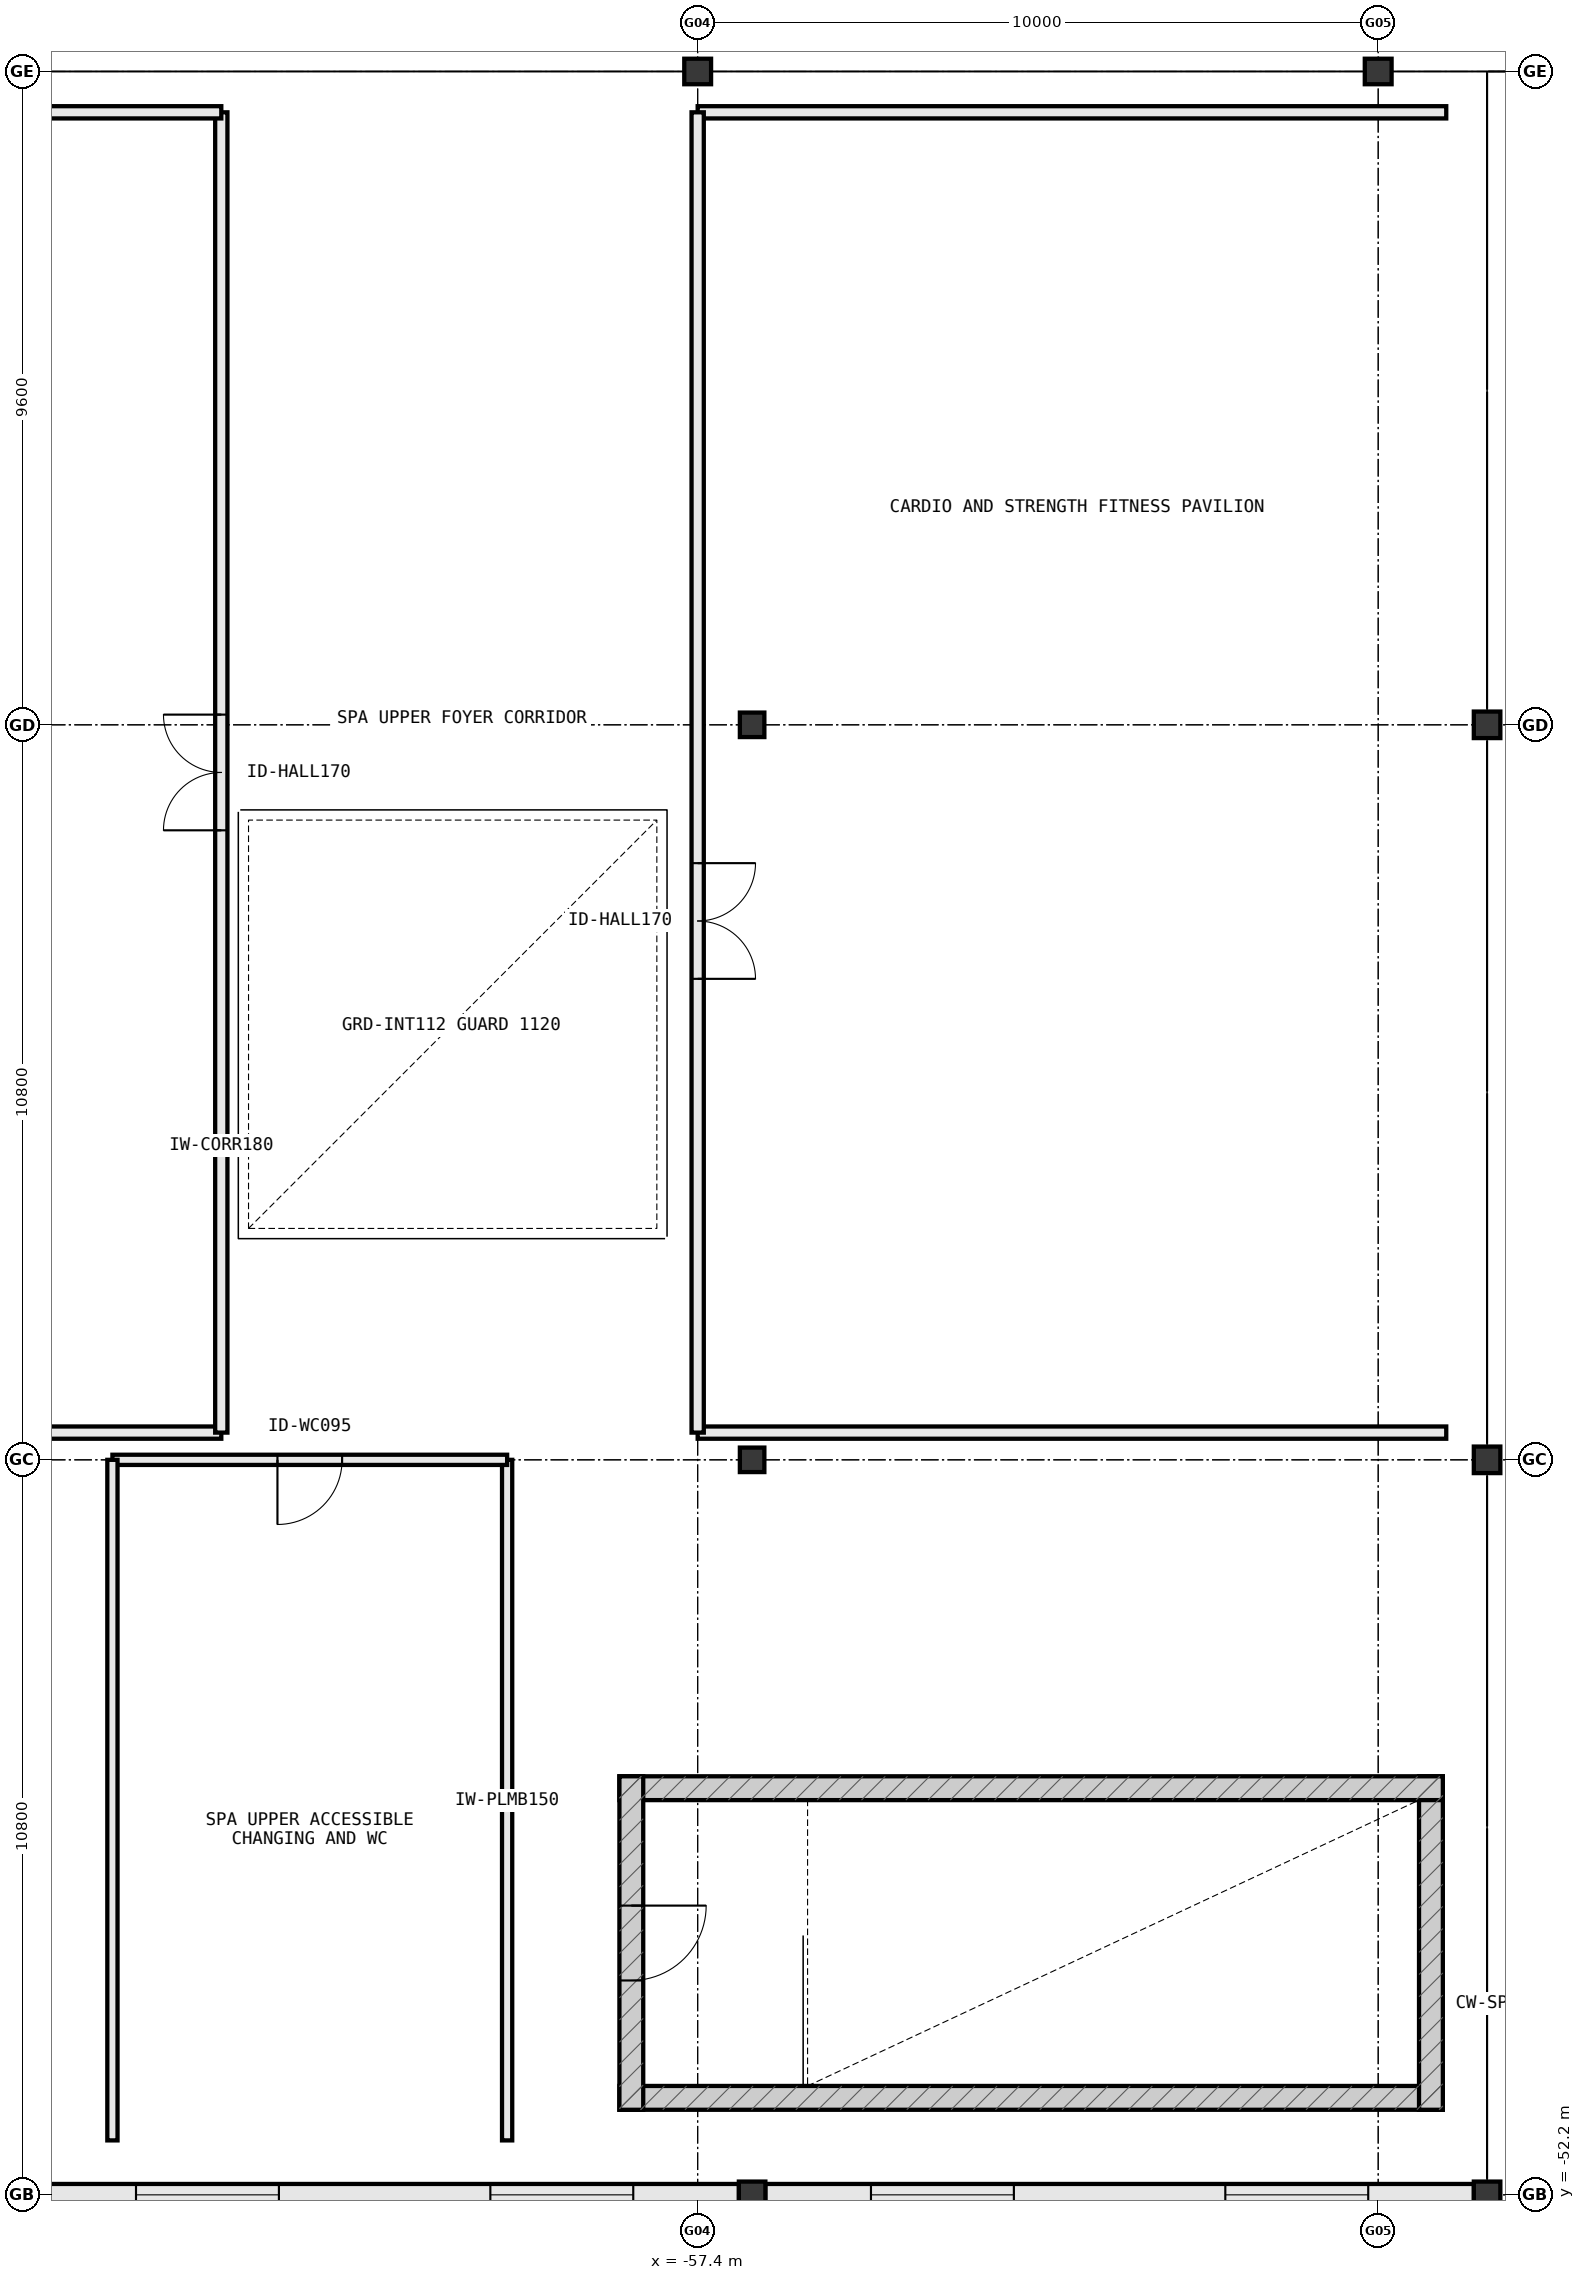
"""IFC4 building model, lengths in metres.
Left out: names, types, materials, properties, quantities, classifications, styles, units other than length and angle.
Written with IfcOpenShell. Run it as: python <this file> out.ifc"""

import sys

from ifc_helpers import new_model, si_unit, direction, frame, frame_2d, origin, origin_2d, place, context, subcontext, project, spatial, rectangle, i_section, extrude, element, fill, save


model = new_model("IFC4")
c1 = context("Model", 3, precision=1e-05, world=origin(), true_north=direction((0.0, 1.0)))
c2 = subcontext(c1, "Body", "Model", "MODEL_VIEW")
j1 = project(units=[si_unit("LENGTHUNIT", "METRE"), si_unit("PLANEANGLEUNIT", "RADIAN")], contexts=[c1])
p1 = place(None, origin())
s1 = spatial("IfcSite", under=j1, at=p1, CompositionType="ELEMENT")
p2 = place(p1, origin())
s2 = spatial("IfcBuilding", under=s1, at=p2, CompositionType="ELEMENT")
p3 = place(p2, frame((0.0, 0.0, 10.8)))
s3 = spatial("IfcBuildingStorey", under=s2, at=p3, CompositionType="ELEMENT", Elevation=10.8)
for number, where, z_axis, x_axis in (
    (1, (-57.4, -21.0, 0.0), (0.0, 0.0, 1.0), (1.0, 0.0, 0.0)),
    (2, (-47.4, -21.0, 0.0), (0.0, 0.0, 1.0), (1.0, 0.0, 0.0)),
):
    element("IfcColumn", number, at=place(p3, frame(where, z_axis=z_axis, x_axis=x_axis)), inside=s3, PredefinedType="COLUMN", context=c2, shape_type="SweptSolid", body=[
        extrude(i_section(OverallWidth=0.394, OverallDepth=0.375, WebThickness=0.017, FlangeThickness=0.028, at=origin_2d()), origin(), (0.0, 0.0, 1.0), 5.4),
    ])
p4 = place(p3, frame((-56.6, -52.2, 0.0), z_axis=(0.0, 0.0, 1.0), x_axis=(1.0, 0.0, 0.0)))
e3 = element("IfcColumn", 3, at=p4, inside=s3, PredefinedType="COLUMN", context=c2, shape_type="SweptSolid", body=[
    extrude(rectangle(XDim=0.39, YDim=0.39, at=origin_2d()), origin(), (0.0, 0.0, 1.0), 5.4),
])
for number, where, z_axis, x_axis in (
    (4, (-56.6, -41.4, 0.0), (0.0, 0.0, 1.0), (1.0, 0.0, 0.0)),
    (5, (-56.6, -30.6, 0.0), (0.0, 0.0, 1.0), (1.0, 0.0, 0.0)),
):
    element("IfcColumn", number, at=place(p3, frame(where, z_axis=z_axis, x_axis=x_axis)), inside=s3, PredefinedType="COLUMN", context=c2, shape_type="SweptSolid", body=[
        extrude(rectangle(XDim=0.36, YDim=0.36, at=origin_2d()), origin(), (0.0, 0.0, 1.0), 5.4),
    ])
for number, where, z_axis, x_axis in (
    (6, (-45.8, -52.2, 0.0), (0.0, 0.0, 1.0), (1.0, 0.0, 0.0)),
    (7, (-45.8, -41.4, 0.0), (0.0, 0.0, 1.0), (1.0, 0.0, 0.0)),
    (8, (-45.8, -30.6, 0.0), (0.0, 0.0, 1.0), (1.0, 0.0, 0.0)),
):
    element("IfcColumn", number, at=place(p3, frame(where, z_axis=z_axis, x_axis=x_axis)), inside=s3, PredefinedType="COLUMN", context=c2, shape_type="SweptSolid", body=[
        extrude(rectangle(XDim=0.39, YDim=0.39, at=origin_2d()), origin(), (0.0, 0.0, 1.0), 5.4),
    ])
p5 = place(p3, frame((-67.207, -52.2, 0.0), z_axis=(0.0, 0.0, 1.0), x_axis=(1.0, 0.0, 0.0)))
e9 = element("IfcWall", 9, at=p5, inside=s3, PredefinedType="STANDARD", context=c2, shape_type="SweptSolid", body=[
    extrude(rectangle(XDim=10.414, YDim=0.32, at=frame_2d((5.207, 0.0))), origin(), (0.0, 0.0, 1.0), 4.016),
])
p6 = place(p5, frame((1.553, 0.0, 0.85)))
e10 = element("IfcOpeningElement", 10, at=p6, cuts=e9, PredefinedType="OPENING", context=c2, shape_type="SweptSolid", body=[
    extrude(rectangle(XDim=2.1, YDim=1.95, at=frame_2d((1.05, 0.975))), frame((0.0, 0.172, 0.0), z_axis=(0.0, -1.0, 0.0), x_axis=(1.0, 0.0, 0.0)), (0.0, 0.0, 1.0), 0.344),
])
p7 = place(p5, frame((6.76, 0.0, 0.85)))
e11 = element("IfcOpeningElement", 11, at=p7, cuts=e9, PredefinedType="OPENING", context=c2, shape_type="SweptSolid", body=[
    extrude(rectangle(XDim=2.1, YDim=1.95, at=frame_2d((1.05, 0.975))), frame((0.0, 0.172, 0.0), z_axis=(0.0, -1.0, 0.0), x_axis=(1.0, 0.0, 0.0)), (0.0, 0.0, 1.0), 0.344),
])
p8 = place(p3, frame((-56.407, -52.2, 0.0), z_axis=(0.0, 0.0, 1.0), x_axis=(1.0, 0.0, 0.0)))
e12 = element("IfcWall", 12, at=p8, inside=s3, PredefinedType="STANDARD", context=c2, shape_type="SweptSolid", body=[
    extrude(rectangle(XDim=10.414, YDim=0.32, at=frame_2d((5.207, 0.0))), origin(), (0.0, 0.0, 1.0), 4.016),
])
p9 = place(p8, frame((1.553, 0.0, 0.85)))
e13 = element("IfcOpeningElement", 13, at=p9, cuts=e12, PredefinedType="OPENING", context=c2, shape_type="SweptSolid", body=[
    extrude(rectangle(XDim=2.1, YDim=1.95, at=frame_2d((1.05, 0.975))), frame((0.0, 0.172, 0.0), z_axis=(0.0, -1.0, 0.0), x_axis=(1.0, 0.0, 0.0)), (0.0, 0.0, 1.0), 0.344),
])
p10 = place(p8, frame((6.76, 0.0, 0.85)))
e14 = element("IfcOpeningElement", 14, at=p10, cuts=e12, PredefinedType="OPENING", context=c2, shape_type="SweptSolid", body=[
    extrude(rectangle(XDim=2.1, YDim=1.95, at=frame_2d((1.05, 0.975))), frame((0.0, 0.172, 0.0), z_axis=(0.0, -1.0, 0.0), x_axis=(1.0, 0.0, 0.0)), (0.0, 0.0, 1.0), 0.344),
])
p11 = place(p3, frame((-58.55, -50.775, 0.0), z_axis=(0.0, 0.0, 1.0), x_axis=(1.0, 0.0, 0.0)))
e15 = element("IfcWall", 15, at=p11, inside=s3, PredefinedType="SHEAR", context=c2, shape_type="SweptSolid", body=[
    extrude(rectangle(XDim=12.1, YDim=0.35, at=frame_2d((6.05, 0.0))), origin(), (0.0, 0.0, 1.0), 4.8),
])
p12 = place(p3, frame((-46.625, -50.95, 0.0), z_axis=(0.0, 0.0, 1.0), x_axis=(0.0, 1.0, 0.0)))
e16 = element("IfcWall", 16, at=p12, inside=s3, PredefinedType="SHEAR", context=c2, shape_type="SweptSolid", body=[
    extrude(rectangle(XDim=4.9, YDim=0.35, at=frame_2d((2.45, 0.0))), origin(), (0.0, 0.0, 1.0), 4.8),
])
p13 = place(p3, frame((-46.45, -46.225, 0.0), z_axis=(0.0, 0.0, 1.0), x_axis=(-1.0, 0.0, 0.0)))
e17 = element("IfcWall", 17, at=p13, inside=s3, PredefinedType="SHEAR", context=c2, shape_type="SweptSolid", body=[
    extrude(rectangle(XDim=12.1, YDim=0.35, at=frame_2d((6.05, 0.0))), origin(), (0.0, 0.0, 1.0), 4.8),
])
p14 = place(p3, frame((-58.375, -46.05, 0.0), z_axis=(0.0, 0.0, 1.0), x_axis=(0.0, -1.0, 0.0)))
e18 = element("IfcWall", 18, at=p14, inside=s3, PredefinedType="SHEAR", context=c2, shape_type="SweptSolid", body=[
    extrude(rectangle(XDim=4.9, YDim=0.35, at=frame_2d((2.45, 0.0))), origin(), (0.0, 0.0, 1.0), 4.8),
])
p15 = place(p14, frame((1.9, 0.0, 0.0)))
e19 = element("IfcOpeningElement", 19, at=p15, cuts=e18, PredefinedType="OPENING", context=c2, shape_type="SweptSolid", body=[
    extrude(rectangle(XDim=1.1, YDim=2.2, at=frame_2d((0.55, 1.1))), frame((0.0, 0.187, 0.0), z_axis=(0.0, -1.0, 0.0), x_axis=(1.0, 0.0, 0.0)), (0.0, 0.0, 1.0), 0.374),
])
p16 = place(p3, frame((-77.6, -41.0, 0.0), z_axis=(0.0, 0.0, 1.0), x_axis=(1.0, 0.0, 0.0)))
e20 = element("IfcWall", 20, at=p16, inside=s3, PredefinedType="PARTITIONING", context=c2, shape_type="SweptSolid", body=[
    extrude(rectangle(XDim=13.2, YDim=0.18, at=frame_2d((6.6, 0.0))), origin(), (0.0, 0.0, 1.0), 4.016),
])
p17 = place(p3, frame((-64.4, -41.0, 0.0), z_axis=(0.0, 0.0, 1.0), x_axis=(0.0, 1.0, 0.0)))
e21 = element("IfcWall", 21, at=p17, inside=s3, PredefinedType="PARTITIONING", context=c2, shape_type="SweptSolid", body=[
    extrude(rectangle(XDim=19.4, YDim=0.18, at=frame_2d((9.7, 0.0))), origin(), (0.0, 0.0, 1.0), 4.8),
])
p18 = place(p17, frame((8.85, 0.0, 0.0)))
e22 = element("IfcOpeningElement", 22, at=p18, cuts=e21, PredefinedType="OPENING", context=c2, shape_type="SweptSolid", body=[
    extrude(rectangle(XDim=1.7, YDim=2.3, at=frame_2d((0.85, 1.15))), frame((0.0, 0.102, 0.0), z_axis=(0.0, -1.0, 0.0), x_axis=(1.0, 0.0, 0.0)), (0.0, 0.0, 1.0), 0.204),
])
p19 = place(p3, frame((-64.4, -21.6, 0.0), z_axis=(0.0, 0.0, 1.0), x_axis=(-1.0, 0.0, 0.0)))
e23 = element("IfcWall", 23, at=p19, inside=s3, PredefinedType="PARTITIONING", context=c2, shape_type="SweptSolid", body=[
    extrude(rectangle(XDim=13.2, YDim=0.18, at=frame_2d((6.6, 0.0))), origin(), (0.0, 0.0, 1.0), 4.8),
])
p20 = place(p3, frame((-57.4, -41.0, 0.0), z_axis=(0.0, 0.0, 1.0), x_axis=(1.0, 0.0, 0.0)))
e24 = element("IfcWall", 24, at=p20, inside=s3, PredefinedType="PARTITIONING", context=c2, shape_type="SweptSolid", body=[
    extrude(rectangle(XDim=11.0, YDim=0.18, at=frame_2d((5.5, 0.0))), origin(), (0.0, 0.0, 1.0), 4.016),
])
p21 = place(p3, frame((-46.4, -21.6, 0.0), z_axis=(0.0, 0.0, 1.0), x_axis=(-1.0, 0.0, 0.0)))
e25 = element("IfcWall", 25, at=p21, inside=s3, PredefinedType="PARTITIONING", context=c2, shape_type="SweptSolid", body=[
    extrude(rectangle(XDim=11.0, YDim=0.18, at=frame_2d((5.5, 0.0))), origin(), (0.0, 0.0, 1.0), 4.8),
])
p22 = place(p3, frame((-57.4, -21.6, 0.0), z_axis=(0.0, 0.0, 1.0), x_axis=(0.0, -1.0, 0.0)))
e26 = element("IfcWall", 26, at=p22, inside=s3, PredefinedType="PARTITIONING", context=c2, shape_type="SweptSolid", body=[
    extrude(rectangle(XDim=19.4, YDim=0.18, at=frame_2d((9.7, 0.0))), origin(), (0.0, 0.0, 1.0), 4.8),
])
p23 = place(p22, frame((11.032, 0.0, 0.0)))
e27 = element("IfcOpeningElement", 27, at=p23, cuts=e26, PredefinedType="OPENING", context=c2, shape_type="SweptSolid", body=[
    extrude(rectangle(XDim=1.7, YDim=2.3, at=frame_2d((0.85, 1.15))), frame((0.0, 0.102, 0.0), z_axis=(0.0, -1.0, 0.0), x_axis=(1.0, 0.0, 0.0)), (0.0, 0.0, 1.0), 0.204),
])
p24 = place(p3, frame((-60.2, -51.4, 0.0), z_axis=(0.0, 0.0, 1.0), x_axis=(0.0, 1.0, 0.0)))
e28 = element("IfcWall", 28, at=p24, inside=s3, PredefinedType="PLUMBINGWALL", context=c2, shape_type="SweptSolid", body=[
    extrude(rectangle(XDim=10.0, YDim=0.15, at=frame_2d((5.0, 0.0))), origin(), (0.0, 0.0, 1.0), 4.8),
])
p25 = place(p3, frame((-60.2, -41.4, 0.0), z_axis=(0.0, 0.0, 1.0), x_axis=(-1.0, 0.0, 0.0)))
e29 = element("IfcWall", 29, at=p25, inside=s3, PredefinedType="PLUMBINGWALL", context=c2, shape_type="SweptSolid", body=[
    extrude(rectangle(XDim=5.8, YDim=0.15, at=frame_2d((2.9, 0.0))), origin(), (0.0, 0.0, 1.0), 4.016),
])
p26 = place(p25, frame((2.425, 0.0, 0.0)))
e30 = element("IfcOpeningElement", 30, at=p26, cuts=e29, PredefinedType="OPENING", context=c2, shape_type="SweptSolid", body=[
    extrude(rectangle(XDim=0.95, YDim=2.15, at=frame_2d((0.475, 1.075))), frame((0.0, 0.087, 0.0), z_axis=(0.0, -1.0, 0.0), x_axis=(1.0, 0.0, 0.0)), (0.0, 0.0, 1.0), 0.174),
])
p27 = place(p3, frame((-66.0, -41.4, 0.0), z_axis=(0.0, 0.0, 1.0), x_axis=(0.0, -1.0, 0.0)))
e31 = element("IfcWall", 31, at=p27, inside=s3, PredefinedType="PLUMBINGWALL", context=c2, shape_type="SweptSolid", body=[
    extrude(rectangle(XDim=10.0, YDim=0.15, at=frame_2d((5.0, 0.0))), origin(), (0.0, 0.0, 1.0), 4.8),
])
p28 = place(p6, origin())
e32 = element("IfcWindow", 32, at=p28, inside=s3, PartitioningType="DOUBLE_PANEL_VERTICAL", PredefinedType="WINDOW", context=c2, shape_type="SweptSolid", body=[
    extrude(rectangle(XDim=2.1, YDim=1.95, at=frame_2d((1.05, 0.975))), frame((0.0, 0.03, 0.0), z_axis=(0.0, -1.0, 0.0), x_axis=(1.0, 0.0, 0.0)), (0.0, 0.0, 1.0), 0.06),
])
fill(e10, e32)
p29 = place(p7, origin())
e33 = element("IfcWindow", 33, at=p29, inside=s3, PartitioningType="DOUBLE_PANEL_VERTICAL", PredefinedType="WINDOW", context=c2, shape_type="SweptSolid", body=[
    extrude(rectangle(XDim=2.1, YDim=1.95, at=frame_2d((1.05, 0.975))), frame((0.0, 0.03, 0.0), z_axis=(0.0, -1.0, 0.0), x_axis=(1.0, 0.0, 0.0)), (0.0, 0.0, 1.0), 0.06),
])
fill(e11, e33)
p30 = place(p9, origin())
e34 = element("IfcWindow", 34, at=p30, inside=s3, PartitioningType="DOUBLE_PANEL_VERTICAL", PredefinedType="WINDOW", context=c2, shape_type="SweptSolid", body=[
    extrude(rectangle(XDim=2.1, YDim=1.95, at=frame_2d((1.05, 0.975))), frame((0.0, 0.03, 0.0), z_axis=(0.0, -1.0, 0.0), x_axis=(1.0, 0.0, 0.0)), (0.0, 0.0, 1.0), 0.06),
])
fill(e13, e34)
p31 = place(p10, origin())
e35 = element("IfcWindow", 35, at=p31, inside=s3, PartitioningType="DOUBLE_PANEL_VERTICAL", PredefinedType="WINDOW", context=c2, shape_type="SweptSolid", body=[
    extrude(rectangle(XDim=2.1, YDim=1.95, at=frame_2d((1.05, 0.975))), frame((0.0, 0.03, 0.0), z_axis=(0.0, -1.0, 0.0), x_axis=(1.0, 0.0, 0.0)), (0.0, 0.0, 1.0), 0.06),
])
fill(e14, e35)
p32 = place(p15, origin())
e36 = element("IfcDoor", 36, at=p32, inside=s3, OperationType="SINGLE_SWING_LEFT", PredefinedType="DOOR", context=c2, shape_type="SweptSolid", body=[
    extrude(rectangle(XDim=1.1, YDim=2.2, at=frame_2d((0.55, 1.1))), frame((0.0, 0.025, 0.0), z_axis=(0.0, -1.0, 0.0), x_axis=(1.0, 0.0, 0.0)), (0.0, 0.0, 1.0), 0.05),
])
fill(e19, e36)
p33 = place(p18, origin())
e37 = element("IfcDoor", 37, at=p33, inside=s3, OperationType="DOUBLE_DOOR_SINGLE_SWING", PredefinedType="DOOR", context=c2, shape_type="SweptSolid", body=[
    extrude(rectangle(XDim=1.7, YDim=2.3, at=frame_2d((0.85, 1.15))), frame((0.0, 0.025, 0.0), z_axis=(0.0, -1.0, 0.0), x_axis=(1.0, 0.0, 0.0)), (0.0, 0.0, 1.0), 0.05),
])
fill(e22, e37)
p34 = place(p23, origin())
e38 = element("IfcDoor", 38, at=p34, inside=s3, OperationType="DOUBLE_DOOR_SINGLE_SWING", PredefinedType="DOOR", context=c2, shape_type="SweptSolid", body=[
    extrude(rectangle(XDim=1.7, YDim=2.3, at=frame_2d((0.85, 1.15))), frame((0.0, 0.025, 0.0), z_axis=(0.0, -1.0, 0.0), x_axis=(1.0, 0.0, 0.0)), (0.0, 0.0, 1.0), 0.05),
])
fill(e27, e38)
p35 = place(p26, origin())
e39 = element("IfcDoor", 39, at=p35, inside=s3, OperationType="SINGLE_SWING_RIGHT", PredefinedType="DOOR", context=c2, shape_type="SweptSolid", body=[
    extrude(rectangle(XDim=0.95, YDim=2.15, at=frame_2d((0.475, 1.075))), frame((0.0, 0.025, 0.0), z_axis=(0.0, -1.0, 0.0), x_axis=(1.0, 0.0, 0.0)), (0.0, 0.0, 1.0), 0.05),
])
fill(e30, e39)
save(model, sys.argv[1])
